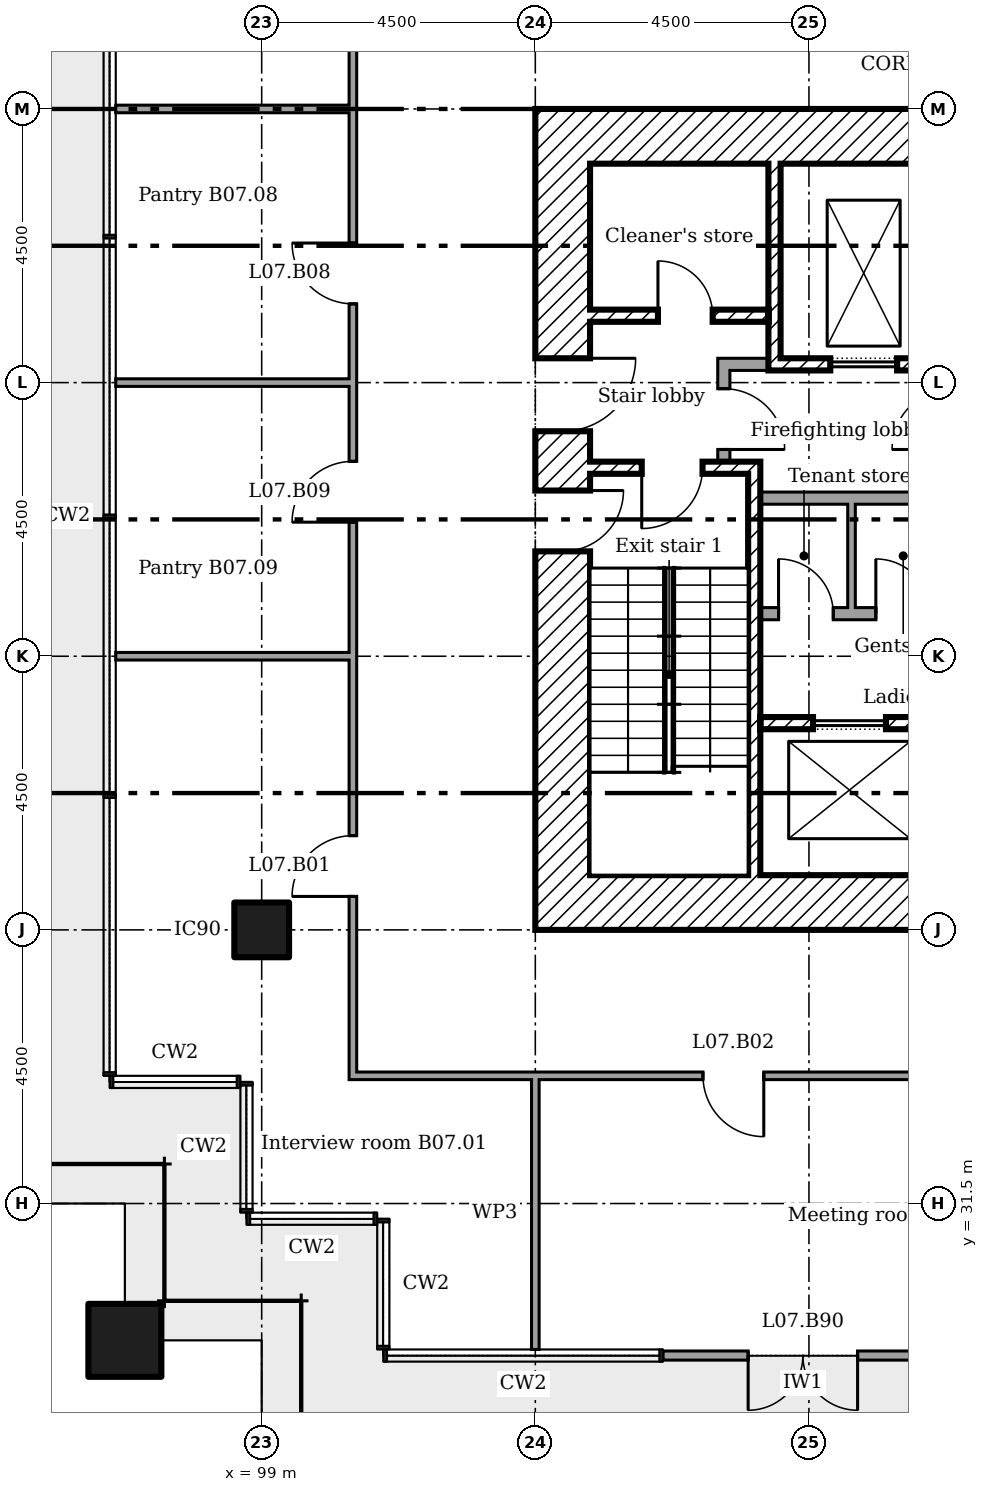
"""IFC4 building model, lengths in metres.
Left out: names, types, materials, properties, quantities, classifications, styles, units other than length and angle.
Written with IfcOpenShell. Run it as: python <this file> out.ifc"""

import sys

from ifc_helpers import new_model, si_unit, direction, frame, frame_2d, origin, origin_2d, place, context, subcontext, project, spatial, rectangle, extrude, element, fill, save


model = new_model("IFC4")
c1 = context("Model", 3, precision=1e-05, world=origin(), true_north=direction((0.0, 1.0)))
c2 = subcontext(c1, "Body", "Model", "MODEL_VIEW")
j1 = project(units=[si_unit("LENGTHUNIT", "METRE"), si_unit("PLANEANGLEUNIT", "RADIAN")], contexts=[c1])
p1 = place(None, origin())
s1 = spatial("IfcSite", under=j1, at=p1, CompositionType="ELEMENT")
p2 = place(p1, origin())
s2 = spatial("IfcBuilding", under=s1, at=p2, CompositionType="ELEMENT")
p3 = place(p2, frame((0.0, 0.0, 34.2)))
s3 = spatial("IfcBuildingStorey", under=s2, at=p3, CompositionType="ELEMENT", Elevation=34.2)
p4 = place(p3, frame((96.75, 29.25, 0.0)))
e1 = element("IfcColumn", 1, at=p4, inside=s3, PredefinedType="COLUMN", context=c2, shape_type="SweptSolid", body=[
    extrude(rectangle(XDim=1.2, YDim=1.2, at=origin_2d()), origin(), (0.0, 0.0, 1.0), 4.4),
])
p5 = place(p3, frame((99.0, 36.0, 0.0)))
e2 = element("IfcColumn", 2, at=p5, inside=s3, PredefinedType="COLUMN", context=c2, shape_type="SweptSolid", body=[
    extrude(rectangle(XDim=0.9, YDim=0.9, at=origin_2d()), origin(), (0.0, 0.0, 1.0), 4.4),
])
p6 = place(p3, frame((105.6, 29.0, 0.0)))
e3 = element("IfcWall", 3, at=p6, inside=s3, PredefinedType="SOLIDWALL", context=c2, shape_type="SweptSolid", body=[
    extrude(rectangle(XDim=4.6, YDim=0.15, at=frame_2d((2.3, 0.0))), origin(), (0.0, 0.0, 1.0), 4.225),
])
p7 = place(p6, frame((1.4, 0.0, 0.0)))
e4 = element("IfcOpeningElement", 4, at=p7, cuts=e3, PredefinedType="OPENING", context=c2, shape_type="SweptSolid", body=[
    extrude(rectangle(XDim=1.8, YDim=2.4, at=frame_2d((0.9, 1.2))), frame((0.0, 0.085, 0.0), z_axis=(0.0, -1.0, 0.0), x_axis=(1.0, 0.0, 0.0)), (0.0, 0.0, 1.0), 0.17),
])
for number, where in (
    (5, (104.4, 49.05, 0.0)),
    (6, (104.4, 36.45, 0.0)),
):
    element("IfcWall", number, at=place(p3, frame(where)), inside=s3, PredefinedType="SHEAR", context=c2, shape_type="SweptSolid", body=[
        extrude(rectangle(XDim=11.7, YDim=0.9, at=frame_2d((5.85, 0.0))), origin(), (0.0, 0.0, 1.0), 4.125),
    ])
p8 = place(p3, frame((103.95, 36.0, 0.0), z_axis=(0.0, 0.0, 1.0), x_axis=(0.0, 1.0, 0.0)))
e7 = element("IfcWall", 7, at=p8, inside=s3, PredefinedType="SHEAR", context=c2, shape_type="SweptSolid", body=[
    extrude(rectangle(XDim=13.5, YDim=0.9, at=frame_2d((6.75, 0.0))), origin(), (0.0, 0.0, 1.0), 4.125),
])
p9 = place(p8, frame((8.2, 0.0, 0.0)))
e8 = element("IfcOpeningElement", 8, at=p9, cuts=e7, PredefinedType="OPENING", context=c2, shape_type="SweptSolid", body=[
    extrude(rectangle(XDim=1.2, YDim=2.1, at=frame_2d((0.6, 1.05))), frame((0.0, 0.46, 0.0), z_axis=(0.0, -1.0, 0.0), x_axis=(1.0, 0.0, 0.0)), (0.0, 0.0, 1.0), 0.92),
])
p10 = place(p8, frame((6.225, 0.0, 0.0)))
e9 = element("IfcOpeningElement", 9, at=p10, cuts=e7, PredefinedType="OPENING", context=c2, shape_type="SweptSolid", body=[
    extrude(rectangle(XDim=1.0, YDim=2.1, at=frame_2d((0.5, 1.05))), frame((0.0, 0.46, 0.0), z_axis=(0.0, -1.0, 0.0), x_axis=(1.0, 0.0, 0.0)), (0.0, 0.0, 1.0), 0.92),
])
p11 = place(p3, frame((107.433, 48.6, 0.0), z_axis=(0.0, 0.0, 1.0), x_axis=(0.0, -1.0, 0.0)))
e10 = element("IfcWall", 10, at=p11, inside=s3, PredefinedType="SHEAR", context=c2, shape_type="SweptSolid", body=[
    extrude(rectangle(XDim=3.4, YDim=0.2, at=frame_2d((1.7, 0.0))), origin(), (0.0, 0.0, 1.0), 4.125),
])
p12 = place(p3, frame((106.5, 45.3, 0.0)))
e11 = element("IfcWall", 11, at=p12, inside=s3, PredefinedType="PARTITIONING", context=c2, shape_type="SweptSolid", body=[
    extrude(rectangle(XDim=0.833, YDim=0.2, at=frame_2d((0.417, 0.0))), origin(), (0.0, 0.0, 1.0), 4.125),
])
p13 = place(p3, frame((106.6, 43.7, 0.0), z_axis=(0.0, 0.0, 1.0), x_axis=(0.0, 1.0, 0.0)))
e12 = element("IfcWall", 12, at=p13, inside=s3, PredefinedType="PARTITIONING", context=c2, shape_type="SweptSolid", body=[
    extrude(rectangle(XDim=1.5, YDim=0.2, at=frame_2d((0.75, 0.0))), origin(), (0.0, 0.0, 1.0), 4.125),
])
p14 = place(p13, frame((0.2, 0.0, 0.0)))
e13 = element("IfcOpeningElement", 13, at=p14, cuts=e12, PredefinedType="OPENING", context=c2, shape_type="SweptSolid", body=[
    extrude(rectangle(XDim=1.0, YDim=2.1, at=frame_2d((0.5, 1.05))), frame((0.0, 0.11, 0.0), z_axis=(0.0, -1.0, 0.0), x_axis=(1.0, 0.0, 0.0)), (0.0, 0.0, 1.0), 0.22),
])
p15 = place(p3, frame((104.4, 46.1, 0.0)))
e14 = element("IfcWall", 14, at=p15, inside=s3, PredefinedType="SHEAR", context=c2, shape_type="SweptSolid", body=[
    extrude(rectangle(XDim=2.933, YDim=0.2, at=frame_2d((1.467, 0.0))), origin(), (0.0, 0.0, 1.0), 4.125),
])
p16 = place(p15, frame((1.117, 0.0, 0.0)))
e15 = element("IfcOpeningElement", 15, at=p16, cuts=e14, PredefinedType="OPENING", context=c2, shape_type="SweptSolid", body=[
    extrude(rectangle(XDim=0.9, YDim=2.1, at=frame_2d((0.45, 1.05))), frame((0.0, 0.11, 0.0), z_axis=(0.0, -1.0, 0.0), x_axis=(1.0, 0.0, 0.0)), (0.0, 0.0, 1.0), 0.22),
])
p17 = place(p3, frame((107.533, 45.3, 0.0)))
e16 = element("IfcWall", 16, at=p17, inside=s3, PredefinedType="SHEAR", context=c2, shape_type="SweptSolid", body=[
    extrude(rectangle(XDim=2.733, YDim=0.2, at=frame_2d((1.367, 0.0))), origin(), (0.0, 0.0, 1.0), 4.125),
])
p18 = place(p17, frame((0.817, 0.0, 0.0)))
e17 = element("IfcOpeningElement", 17, at=p18, cuts=e16, PredefinedType="OPENING", context=c2, shape_type="SweptSolid", body=[
    extrude(rectangle(XDim=1.1, YDim=2.1, at=frame_2d((0.55, 1.05))), frame((0.0, 0.11, 0.0), z_axis=(0.0, -1.0, 0.0), x_axis=(1.0, 0.0, 0.0)), (0.0, 0.0, 1.0), 0.22),
])
p19 = place(p3, frame((107.2, 39.4, 0.0)))
e18 = element("IfcWall", 18, at=p19, inside=s3, PredefinedType="SHEAR", context=c2, shape_type="SweptSolid", body=[
    extrude(rectangle(XDim=8.9, YDim=0.2, at=frame_2d((4.45, 0.0))), origin(), (0.0, 0.0, 1.0), 4.125),
])
p20 = place(p19, frame((0.867, 0.0, 0.0)))
e19 = element("IfcOpeningElement", 19, at=p20, cuts=e18, PredefinedType="OPENING", context=c2, shape_type="SweptSolid", body=[
    extrude(rectangle(XDim=1.2, YDim=2.1, at=frame_2d((0.6, 1.05))), frame((0.0, 0.11, 0.0), z_axis=(0.0, -1.0, 0.0), x_axis=(1.0, 0.0, 0.0)), (0.0, 0.0, 1.0), 0.22),
])
p21 = place(p19, frame((3.8, 0.0, 0.0)))
e20 = element("IfcOpeningElement", 20, at=p21, cuts=e18, PredefinedType="OPENING", context=c2, shape_type="SweptSolid", body=[
    extrude(rectangle(XDim=1.2, YDim=2.1, at=frame_2d((0.6, 1.05))), frame((0.0, 0.11, 0.0), z_axis=(0.0, -1.0, 0.0), x_axis=(1.0, 0.0, 0.0)), (0.0, 0.0, 1.0), 0.22),
])
p22 = place(p19, frame((6.733, 0.0, 0.0)))
e21 = element("IfcOpeningElement", 21, at=p22, cuts=e18, PredefinedType="OPENING", context=c2, shape_type="SweptSolid", body=[
    extrude(rectangle(XDim=1.2, YDim=2.1, at=frame_2d((0.6, 1.05))), frame((0.0, 0.11, 0.0), z_axis=(0.0, -1.0, 0.0), x_axis=(1.0, 0.0, 0.0)), (0.0, 0.0, 1.0), 0.22),
])
p23 = place(p3, frame((107.1, 36.9, 0.0), z_axis=(0.0, 0.0, 1.0), x_axis=(0.0, 1.0, 0.0)))
e22 = element("IfcWall", 22, at=p23, inside=s3, PredefinedType="SHEAR", context=c2, shape_type="SweptSolid", body=[
    extrude(rectangle(XDim=6.8, YDim=0.2, at=frame_2d((3.4, 0.0))), origin(), (0.0, 0.0, 1.0), 4.125),
])
p24 = place(p3, frame((104.4, 43.6, 0.0)))
e23 = element("IfcWall", 23, at=p24, inside=s3, PredefinedType="SHEAR", context=c2, shape_type="SweptSolid", body=[
    extrude(rectangle(XDim=2.6, YDim=0.2, at=frame_2d((1.3, 0.0))), origin(), (0.0, 0.0, 1.0), 4.125),
])
p25 = place(p24, frame((0.85, 0.0, 0.0)))
e24 = element("IfcOpeningElement", 24, at=p25, cuts=e23, PredefinedType="OPENING", context=c2, shape_type="SweptSolid", body=[
    extrude(rectangle(XDim=1.0, YDim=2.1, at=frame_2d((0.5, 1.05))), frame((0.0, 0.11, 0.0), z_axis=(0.0, -1.0, 0.0), x_axis=(1.0, 0.0, 0.0)), (0.0, 0.0, 1.0), 0.22),
])
p26 = place(p3, frame((107.2, 43.1, 0.0)))
e25 = element("IfcWall", 25, at=p26, inside=s3, PredefinedType="PARTITIONING", context=c2, shape_type="SweptSolid", body=[
    extrude(rectangle(XDim=6.1, YDim=0.2, at=frame_2d((3.05, 0.0))), origin(), (0.0, 0.0, 1.0), 4.125),
])
p27 = place(p26, frame((3.509, 0.0, 0.0)))
e26 = element("IfcOpeningElement", 26, at=p27, cuts=e25, PredefinedType="OPENING", context=c2, shape_type="SweptSolid", body=[
    extrude(rectangle(XDim=0.9, YDim=2.1, at=frame_2d((0.45, 1.05))), frame((0.0, 0.11, 0.0), z_axis=(0.0, -1.0, 0.0), x_axis=(1.0, 0.0, 0.0)), (0.0, 0.0, 1.0), 0.22),
])
p28 = place(p26, frame((4.9, 0.0, 0.0)))
e27 = element("IfcOpeningElement", 27, at=p28, cuts=e25, PredefinedType="OPENING", context=c2, shape_type="SweptSolid", body=[
    extrude(rectangle(XDim=0.9, YDim=2.1, at=frame_2d((0.45, 1.05))), frame((0.0, 0.11, 0.0), z_axis=(0.0, -1.0, 0.0), x_axis=(1.0, 0.0, 0.0)), (0.0, 0.0, 1.0), 0.22),
])
p29 = place(p3, frame((107.2, 41.2, 0.0)))
e28 = element("IfcWall", 28, at=p29, inside=s3, PredefinedType="PARTITIONING", context=c2, shape_type="SweptSolid", body=[
    extrude(rectangle(XDim=6.1, YDim=0.2, at=frame_2d((3.05, 0.0))), origin(), (0.0, 0.0, 1.0), 4.125),
])
p30 = place(p29, frame((0.3, 0.0, 0.0)))
e29 = element("IfcOpeningElement", 29, at=p30, cuts=e28, PredefinedType="OPENING", context=c2, shape_type="SweptSolid", body=[
    extrude(rectangle(XDim=0.9, YDim=2.1, at=frame_2d((0.45, 1.05))), frame((0.0, 0.11, 0.0), z_axis=(0.0, -1.0, 0.0), x_axis=(1.0, 0.0, 0.0)), (0.0, 0.0, 1.0), 0.22),
])
p31 = place(p29, frame((1.9, 0.0, 0.0)))
e30 = element("IfcOpeningElement", 30, at=p31, cuts=e28, PredefinedType="OPENING", context=c2, shape_type="SweptSolid", body=[
    extrude(rectangle(XDim=0.9, YDim=2.1, at=frame_2d((0.45, 1.05))), frame((0.0, 0.11, 0.0), z_axis=(0.0, -1.0, 0.0), x_axis=(1.0, 0.0, 0.0)), (0.0, 0.0, 1.0), 0.22),
])
p32 = place(p3, frame((108.7, 41.3, 0.0), z_axis=(0.0, 0.0, 1.0), x_axis=(0.0, 1.0, 0.0)))
e31 = element("IfcWall", 31, at=p32, inside=s3, PredefinedType="PARTITIONING", context=c2, shape_type="SweptSolid", body=[
    extrude(rectangle(XDim=1.7, YDim=0.125, at=frame_2d((0.85, 0.0))), origin(), (0.0, 0.0, 1.0), 4.125),
])
p33 = place(p3, frame((100.438, 33.6, 0.0)))
e32 = element("IfcWall", 32, at=p33, inside=s3, PredefinedType="PARTITIONING", context=c2, shape_type="SweptSolid", body=[
    extrude(rectangle(XDim=19.325, YDim=0.125, at=frame_2d((9.663, 0.0))), origin(), (0.0, 0.0, 1.0), 4.225),
])
p34 = place(p33, frame((5.82, 0.0, 0.0)))
e33 = element("IfcOpeningElement", 33, at=p34, cuts=e32, PredefinedType="OPENING", context=c2, shape_type="SweptSolid", body=[
    extrude(rectangle(XDim=1.0, YDim=2.1, at=frame_2d((0.5, 1.05))), frame((0.0, 0.073, 0.0), z_axis=(0.0, -1.0, 0.0), x_axis=(1.0, 0.0, 0.0)), (0.0, 0.0, 1.0), 0.145),
])
p35 = place(p33, frame((15.686, 0.0, 0.0)))
e34 = element("IfcOpeningElement", 34, at=p35, cuts=e32, PredefinedType="OPENING", context=c2, shape_type="SweptSolid", body=[
    extrude(rectangle(XDim=1.0, YDim=2.1, at=frame_2d((0.5, 1.05))), frame((0.0, 0.073, 0.0), z_axis=(0.0, -1.0, 0.0), x_axis=(1.0, 0.0, 0.0)), (0.0, 0.0, 1.0), 0.145),
])
for number, where in (
    (35, (96.6, 40.5, 0.0)),
    (36, (96.6, 45.0, 0.0)),
    (37, (96.6, 49.5, 0.0)),
):
    element("IfcWall", number, at=place(p3, frame(where)), inside=s3, PredefinedType="PARTITIONING", context=c2, shape_type="SweptSolid", body=[
        extrude(rectangle(XDim=3.9, YDim=0.125, at=frame_2d((1.95, 0.0))), origin(), (0.0, 0.0, 1.0), 3.613),
    ])
p36 = place(p3, frame((100.5, 33.663, 0.0), z_axis=(0.0, 0.0, 1.0), x_axis=(0.0, 1.0, 0.0)))
e38 = element("IfcWall", 38, at=p36, inside=s3, PredefinedType="PARTITIONING", context=c2, shape_type="SweptSolid", body=[
    extrude(rectangle(XDim=17.875, YDim=0.125, at=frame_2d((8.938, 0.0))), origin(), (0.0, 0.0, 1.0), 4.225),
])
p37 = place(p36, frame((2.887, 0.0, 0.0)))
e39 = element("IfcOpeningElement", 39, at=p37, cuts=e38, PredefinedType="OPENING", context=c2, shape_type="SweptSolid", body=[
    extrude(rectangle(XDim=1.0, YDim=2.1, at=frame_2d((0.5, 1.05))), frame((0.0, 0.073, 0.0), z_axis=(0.0, -1.0, 0.0), x_axis=(1.0, 0.0, 0.0)), (0.0, 0.0, 1.0), 0.145),
])
p38 = place(p36, frame((12.633, 0.0, 0.0)))
e40 = element("IfcOpeningElement", 40, at=p38, cuts=e38, PredefinedType="OPENING", context=c2, shape_type="SweptSolid", body=[
    extrude(rectangle(XDim=1.0, YDim=2.1, at=frame_2d((0.5, 1.05))), frame((0.0, 0.073, 0.0), z_axis=(0.0, -1.0, 0.0), x_axis=(1.0, 0.0, 0.0)), (0.0, 0.0, 1.0), 0.145),
])
p39 = place(p36, frame((9.042, 0.0, 0.0)))
e41 = element("IfcOpeningElement", 41, at=p39, cuts=e38, PredefinedType="OPENING", context=c2, shape_type="SweptSolid", body=[
    extrude(rectangle(XDim=1.0, YDim=2.1, at=frame_2d((0.5, 1.05))), frame((0.0, 0.073, 0.0), z_axis=(0.0, -1.0, 0.0), x_axis=(1.0, 0.0, 0.0)), (0.0, 0.0, 1.0), 0.145),
])
p40 = place(p3, frame((103.5, 29.1, 0.0), z_axis=(0.0, 0.0, 1.0), x_axis=(0.0, 1.0, 0.0)))
e42 = element("IfcWall", 42, at=p40, inside=s3, PredefinedType="MOVABLE", context=c2, shape_type="SweptSolid", body=[
    extrude(rectangle(XDim=4.5, YDim=0.125, at=frame_2d((2.25, 0.0))), origin(), (0.0, 0.0, 1.0), 3.613),
])
p41 = place(p7, frame((1.8, 0.0, 0.0), x_axis=(-1.0, 0.0, 0.0)))
e43 = element("IfcDoor", 43, at=p41, inside=s3, OperationType="DOUBLE_DOOR_DOUBLE_SWING", PredefinedType="NOTDEFINED", context=c2, shape_type="SweptSolid", body=[
    extrude(rectangle(XDim=1.8, YDim=2.4, at=frame_2d((0.9, 1.2))), frame((0.0, 0.025, 0.0), z_axis=(0.0, -1.0, 0.0), x_axis=(1.0, 0.0, 0.0)), (0.0, 0.0, 1.0), 0.05),
])
fill(e4, e43)
p42 = place(p9, frame((1.2, 0.0, 0.0), x_axis=(-1.0, 0.0, 0.0)))
e44 = element("IfcDoor", 44, at=p42, inside=s3, OperationType="SINGLE_SWING_RIGHT", PredefinedType="DOOR", context=c2, shape_type="SweptSolid", body=[
    extrude(rectangle(XDim=1.2, YDim=2.1, at=frame_2d((0.6, 1.05))), frame((0.0, 0.025, 0.0), z_axis=(0.0, -1.0, 0.0), x_axis=(1.0, 0.0, 0.0)), (0.0, 0.0, 1.0), 0.05),
])
fill(e8, e44)
p43 = place(p25, frame((1.0, 0.0, 0.0), x_axis=(-1.0, 0.0, 0.0)))
e45 = element("IfcDoor", 45, at=p43, inside=s3, OperationType="SINGLE_SWING_LEFT", PredefinedType="DOOR", context=c2, shape_type="SweptSolid", body=[
    extrude(rectangle(XDim=1.0, YDim=2.1, at=frame_2d((0.5, 1.05))), frame((0.0, 0.025, 0.0), z_axis=(0.0, -1.0, 0.0), x_axis=(1.0, 0.0, 0.0)), (0.0, 0.0, 1.0), 0.05),
])
fill(e24, e45)
p44 = place(p10, frame((1.0, 0.0, 0.0), x_axis=(-1.0, 0.0, 0.0)))
e46 = element("IfcDoor", 46, at=p44, inside=s3, OperationType="SINGLE_SWING_RIGHT", PredefinedType="DOOR", context=c2, shape_type="SweptSolid", body=[
    extrude(rectangle(XDim=1.0, YDim=2.1, at=frame_2d((0.5, 1.05))), frame((0.0, 0.025, 0.0), z_axis=(0.0, -1.0, 0.0), x_axis=(1.0, 0.0, 0.0)), (0.0, 0.0, 1.0), 0.05),
])
fill(e9, e46)
p45 = place(p14, frame((1.0, 0.0, 0.0), x_axis=(-1.0, 0.0, 0.0)))
e47 = element("IfcDoor", 47, at=p45, inside=s3, OperationType="SINGLE_SWING_LEFT", PredefinedType="DOOR", context=c2, shape_type="SweptSolid", body=[
    extrude(rectangle(XDim=1.0, YDim=2.1, at=frame_2d((0.5, 1.05))), frame((0.0, 0.025, 0.0), z_axis=(0.0, -1.0, 0.0), x_axis=(1.0, 0.0, 0.0)), (0.0, 0.0, 1.0), 0.05),
])
fill(e13, e47)
p46 = place(p16, origin())
e48 = element("IfcDoor", 48, at=p46, inside=s3, OperationType="SINGLE_SWING_RIGHT", PredefinedType="DOOR", context=c2, shape_type="SweptSolid", body=[
    extrude(rectangle(XDim=0.9, YDim=2.1, at=frame_2d((0.45, 1.05))), frame((0.0, 0.025, 0.0), z_axis=(0.0, -1.0, 0.0), x_axis=(1.0, 0.0, 0.0)), (0.0, 0.0, 1.0), 0.05),
])
fill(e15, e48)
p47 = place(p30, origin())
e49 = element("IfcDoor", 49, at=p47, inside=s3, OperationType="SINGLE_SWING_RIGHT", PredefinedType="DOOR", context=c2, shape_type="SweptSolid", body=[
    extrude(rectangle(XDim=0.9, YDim=2.1, at=frame_2d((0.45, 1.05))), frame((0.0, 0.025, 0.0), z_axis=(0.0, -1.0, 0.0), x_axis=(1.0, 0.0, 0.0)), (0.0, 0.0, 1.0), 0.05),
])
fill(e29, e49)
p48 = place(p31, origin())
e50 = element("IfcDoor", 50, at=p48, inside=s3, OperationType="SINGLE_SWING_RIGHT", PredefinedType="DOOR", context=c2, shape_type="SweptSolid", body=[
    extrude(rectangle(XDim=0.9, YDim=2.1, at=frame_2d((0.45, 1.05))), frame((0.0, 0.025, 0.0), z_axis=(0.0, -1.0, 0.0), x_axis=(1.0, 0.0, 0.0)), (0.0, 0.0, 1.0), 0.05),
])
fill(e30, e50)
p49 = place(p18, origin())
e51 = element("IfcDoor", 51, at=p49, inside=s3, OperationType="SLIDING_TO_LEFT", PredefinedType="DOOR", context=c2, shape_type="SweptSolid", body=[
    extrude(rectangle(XDim=1.1, YDim=2.1, at=frame_2d((0.55, 1.05))), frame((0.0, 0.025, 0.0), z_axis=(0.0, -1.0, 0.0), x_axis=(1.0, 0.0, 0.0)), (0.0, 0.0, 1.0), 0.05),
])
fill(e17, e51)
p50 = place(p20, origin())
e52 = element("IfcDoor", 52, at=p50, inside=s3, OperationType="SLIDING_TO_LEFT", PredefinedType="DOOR", context=c2, shape_type="SweptSolid", body=[
    extrude(rectangle(XDim=1.2, YDim=2.1, at=frame_2d((0.6, 1.05))), frame((0.0, 0.025, 0.0), z_axis=(0.0, -1.0, 0.0), x_axis=(1.0, 0.0, 0.0)), (0.0, 0.0, 1.0), 0.05),
])
fill(e19, e52)
p51 = place(p37, origin())
e53 = element("IfcDoor", 53, at=p51, inside=s3, OperationType="SINGLE_SWING_RIGHT", PredefinedType="DOOR", context=c2, shape_type="SweptSolid", body=[
    extrude(rectangle(XDim=1.0, YDim=2.1, at=frame_2d((0.5, 1.05))), frame((0.0, 0.025, 0.0), z_axis=(0.0, -1.0, 0.0), x_axis=(1.0, 0.0, 0.0)), (0.0, 0.0, 1.0), 0.05),
])
fill(e39, e53)
p52 = place(p34, frame((1.0, 0.0, 0.0), x_axis=(-1.0, 0.0, 0.0)))
e54 = element("IfcDoor", 54, at=p52, inside=s3, OperationType="SINGLE_SWING_RIGHT", PredefinedType="DOOR", context=c2, shape_type="SweptSolid", body=[
    extrude(rectangle(XDim=1.0, YDim=2.1, at=frame_2d((0.5, 1.05))), frame((0.0, 0.025, 0.0), z_axis=(0.0, -1.0, 0.0), x_axis=(1.0, 0.0, 0.0)), (0.0, 0.0, 1.0), 0.05),
])
fill(e33, e54)
p53 = place(p38, origin())
e55 = element("IfcDoor", 55, at=p53, inside=s3, OperationType="SINGLE_SWING_LEFT", PredefinedType="DOOR", context=c2, shape_type="SweptSolid", body=[
    extrude(rectangle(XDim=1.0, YDim=2.1, at=frame_2d((0.5, 1.05))), frame((0.0, 0.025, 0.0), z_axis=(0.0, -1.0, 0.0), x_axis=(1.0, 0.0, 0.0)), (0.0, 0.0, 1.0), 0.05),
])
fill(e40, e55)
p54 = place(p39, origin())
e56 = element("IfcDoor", 56, at=p54, inside=s3, OperationType="SINGLE_SWING_RIGHT", PredefinedType="DOOR", context=c2, shape_type="SweptSolid", body=[
    extrude(rectangle(XDim=1.0, YDim=2.1, at=frame_2d((0.5, 1.05))), frame((0.0, 0.025, 0.0), z_axis=(0.0, -1.0, 0.0), x_axis=(1.0, 0.0, 0.0)), (0.0, 0.0, 1.0), 0.05),
])
fill(e41, e56)
save(model, sys.argv[1])
